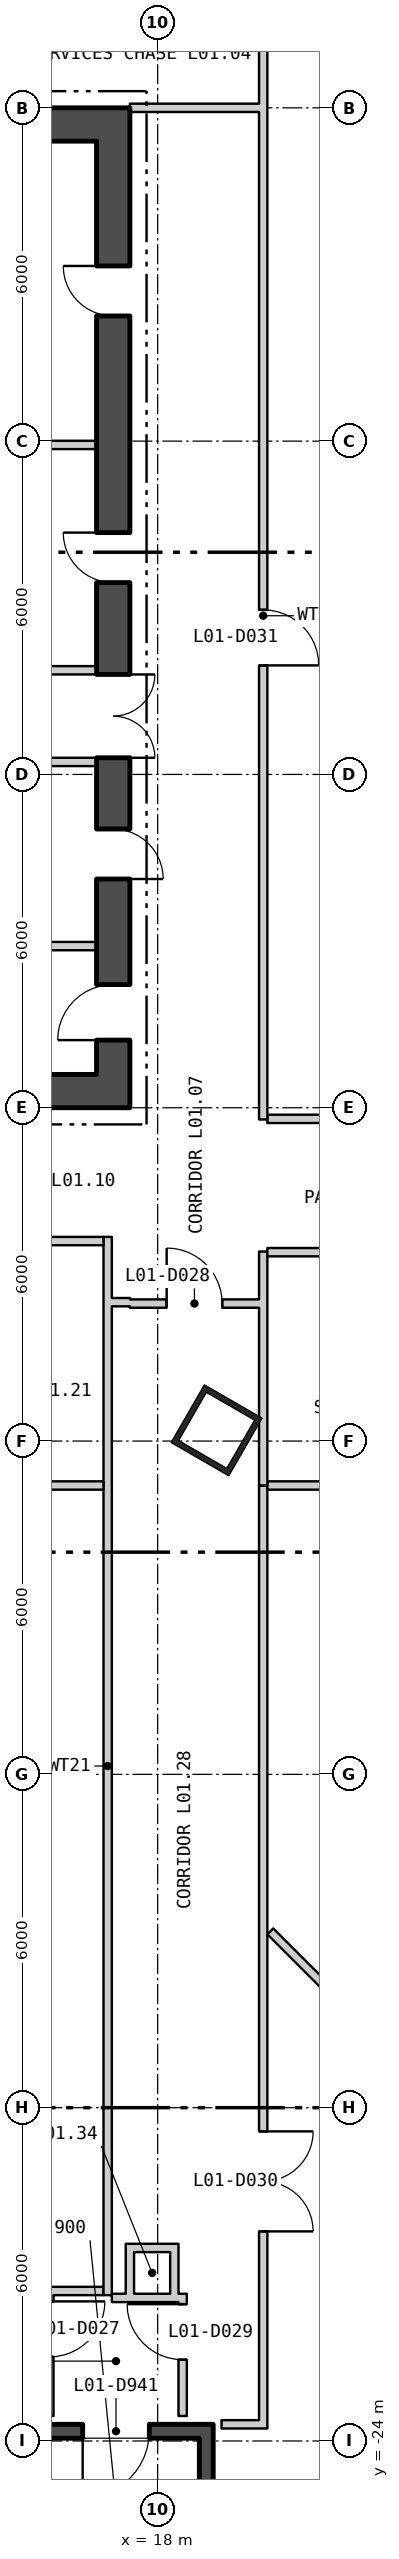
"""IFC4 building model, lengths in metres.
Left out: names, types, materials, properties, quantities, classifications, styles, units other than length and angle.
Written with IfcOpenShell. Run it as: python <this file> out.ifc"""

import sys

from ifc_helpers import new_model, si_unit, direction, frame, frame_2d, origin, origin_2d, place, context, subcontext, project, spatial, rectangle, hollow_rectangle, extrude, element, fill, save


model = new_model("IFC4")
c1 = context("Model", 3, precision=1e-05, world=origin(), true_north=direction((0.0, 1.0)))
c2 = subcontext(c1, "Body", "Model", "MODEL_VIEW")
j1 = project(units=[si_unit("LENGTHUNIT", "METRE"), si_unit("PLANEANGLEUNIT", "RADIAN")], contexts=[c1])
p1 = place(None, origin())
s1 = spatial("IfcSite", under=j1, at=p1, CompositionType="ELEMENT")
p2 = place(p1, origin())
s2 = spatial("IfcBuilding", under=s1, at=p2, CompositionType="ELEMENT")
p3 = place(p2, frame((0.0, 0.0, 8.4)))
s3 = spatial("IfcBuildingStorey", under=s2, at=p3, CompositionType="ELEMENT", Elevation=8.4)
p4 = place(p3, frame((19.061, -5.807, 0.0), z_axis=(0.0, 0.0, 1.0), x_axis=(0.5, 0.866025403784, 0.0)))
e1 = element("IfcColumn", 1, at=p4, inside=s3, PredefinedType="COLUMN", context=c2, shape_type="SweptSolid", body=[
    extrude(hollow_rectangle(XDim=1.2, YDim=1.2, WallThickness=0.1, at=origin_2d()), origin(), (0.0, 0.0, 1.0), 5.1),
])
p5 = place(p3, frame((-17.5, 0.3, 0.0), z_axis=(0.0, 0.0, 1.0), x_axis=(1.0, 0.0, 0.0)))
e2 = element("IfcWall", 2, at=p5, inside=s3, PredefinedType="SHEAR", context=c2, shape_type="SweptSolid", body=[
    extrude(rectangle(XDim=35.0, YDim=0.6, at=frame_2d((17.5, 0.0))), origin(), (0.0, 0.0, 1.0), 4.88),
])
p6 = place(p5, frame((12.0, 0.0, 0.0)))
e3 = element("IfcOpeningElement", 3, at=p6, cuts=e2, PredefinedType="OPENING", context=c2, shape_type="SweptSolid", body=[
    extrude(rectangle(XDim=1.8, YDim=2.4, at=frame_2d((0.9, 1.2))), frame((0.0, 0.31, 0.0), z_axis=(0.0, -1.0, 0.0), x_axis=(1.0, 0.0, 0.0)), (0.0, 0.0, 1.0), 0.62),
])
p7 = place(p5, frame((22.0, 0.0, 0.0)))
e4 = element("IfcOpeningElement", 4, at=p7, cuts=e2, PredefinedType="OPENING", context=c2, shape_type="SweptSolid", body=[
    extrude(rectangle(XDim=1.8, YDim=2.4, at=frame_2d((0.9, 1.2))), frame((0.0, 0.31, 0.0), z_axis=(0.0, -1.0, 0.0), x_axis=(1.0, 0.0, 0.0)), (0.0, 0.0, 1.0), 0.62),
])
p8 = place(p3, frame((-17.5, 17.7, 0.0), z_axis=(0.0, 0.0, 1.0), x_axis=(1.0, 0.0, 0.0)))
e5 = element("IfcWall", 5, at=p8, inside=s3, PredefinedType="SHEAR", context=c2, shape_type="SweptSolid", body=[
    extrude(rectangle(XDim=35.0, YDim=0.6, at=frame_2d((17.5, 0.0))), origin(), (0.0, 0.0, 1.0), 4.88),
])
p9 = place(p3, frame((17.2, 0.6, 0.0), z_axis=(0.0, 0.0, 1.0), x_axis=(0.0, 1.0, 0.0)))
e6 = element("IfcWall", 6, at=p9, inside=s3, PredefinedType="SHEAR", context=c2, shape_type="SweptSolid", body=[
    extrude(rectangle(XDim=16.8, YDim=0.6, at=frame_2d((8.4, 0.0))), origin(), (0.0, 0.0, 1.0), 4.88),
])
p10 = place(p9, frame((5.7, 0.0, 0.0)))
e7 = element("IfcOpeningElement", 7, at=p10, cuts=e6, PredefinedType="OPENING", context=c2, shape_type="SweptSolid", body=[
    extrude(rectangle(XDim=1.5, YDim=2.1, at=frame_2d((0.75, 1.05))), frame((0.0, 0.31, 0.0), z_axis=(0.0, -1.0, 0.0), x_axis=(1.0, 0.0, 0.0)), (0.0, 0.0, 1.0), 0.62),
])
p11 = place(p9, frame((0.618, 0.0, 0.0)))
e8 = element("IfcOpeningElement", 8, at=p11, cuts=e6, PredefinedType="OPENING", context=c2, shape_type="SweptSolid", body=[
    extrude(rectangle(XDim=1.0, YDim=2.1, at=frame_2d((0.5, 1.05))), frame((0.0, 0.31, 0.0), z_axis=(0.0, -1.0, 0.0), x_axis=(1.0, 0.0, 0.0)), (0.0, 0.0, 1.0), 0.62),
])
p12 = place(p9, frame((3.518, 0.0, 0.0)))
e9 = element("IfcOpeningElement", 9, at=p12, cuts=e6, PredefinedType="OPENING", context=c2, shape_type="SweptSolid", body=[
    extrude(rectangle(XDim=0.9, YDim=2.1, at=frame_2d((0.45, 1.05))), frame((0.0, 0.31, 0.0), z_axis=(0.0, -1.0, 0.0), x_axis=(1.0, 0.0, 0.0)), (0.0, 0.0, 1.0), 0.62),
])
p13 = place(p9, frame((8.853, 0.0, 0.0)))
e10 = element("IfcOpeningElement", 10, at=p13, cuts=e6, PredefinedType="OPENING", context=c2, shape_type="SweptSolid", body=[
    extrude(rectangle(XDim=0.9, YDim=2.1, at=frame_2d((0.45, 1.05))), frame((0.0, 0.31, 0.0), z_axis=(0.0, -1.0, 0.0), x_axis=(1.0, 0.0, 0.0)), (0.0, 0.0, 1.0), 0.62),
])
p14 = place(p9, frame((13.653, 0.0, 0.0)))
e11 = element("IfcOpeningElement", 11, at=p14, cuts=e6, PredefinedType="OPENING", context=c2, shape_type="SweptSolid", body=[
    extrude(rectangle(XDim=0.9, YDim=2.1, at=frame_2d((0.45, 1.05))), frame((0.0, 0.31, 0.0), z_axis=(0.0, -1.0, 0.0), x_axis=(1.0, 0.0, 0.0)), (0.0, 0.0, 1.0), 0.62),
])
for number, where, z_axis, x_axis in (
    (12, (14.5, 6.225, 0.0), (0.0, 0.0, 1.0), (1.0, 0.0, 0.0)),
    (13, (14.5, 7.875, 0.0), (0.0, 0.0, 1.0), (1.0, 0.0, 0.0)),
    (14, (14.5, 2.91, 0.0), (0.0, 0.0, 1.0), (1.0, 0.0, 0.0)),
    (15, (14.5, 11.932, 0.0), (0.0, 0.0, 1.0), (1.0, 0.0, 0.0)),
):
    element("IfcWall", number, at=place(p3, frame(where, z_axis=z_axis, x_axis=x_axis)), inside=s3, PredefinedType="PARTITIONING", context=c2, shape_type="SweptSolid", body=[
        extrude(rectangle(XDim=2.4, YDim=0.15, at=frame_2d((1.2, 0.0))), origin(), (0.0, 0.0, 1.0), 4.88),
    ])
p15 = place(p3, frame((18.875, -31.25, 0.0), z_axis=(0.0, 0.0, 1.0), x_axis=(0.0, 1.0, 0.0)))
e16 = element("IfcWall", 16, at=p15, inside=s3, PredefinedType="SHEAR", context=c2, shape_type="SweptSolid", body=[
    extrude(rectangle(XDim=7.3, YDim=0.25, at=frame_2d((3.65, 0.0))), origin(), (0.0, 0.0, 1.0), 4.88),
])
p16 = place(p3, frame((15.5, -23.825, 0.0), z_axis=(0.0, 0.0, 1.0), x_axis=(1.0, 0.0, 0.0)))
e17 = element("IfcWall", 17, at=p16, inside=s3, PredefinedType="SHEAR", context=c2, shape_type="SweptSolid", body=[
    extrude(rectangle(XDim=3.5, YDim=0.25, at=frame_2d((1.75, 0.0))), origin(), (0.0, 0.0, 1.0), 4.88),
])
p17 = place(p16, frame((1.15, 0.0, 0.0)))
e18 = element("IfcOpeningElement", 18, at=p17, cuts=e17, PredefinedType="OPENING", context=c2, shape_type="SweptSolid", body=[
    extrude(rectangle(XDim=1.2, YDim=2.1, at=frame_2d((0.6, 1.05))), frame((0.0, 0.135, 0.0), z_axis=(0.0, -1.0, 0.0), x_axis=(1.0, 0.0, 0.0)), (0.0, 0.0, 1.0), 0.27),
])
p18 = place(p3, frame((1.7, -21.3, 0.0), z_axis=(0.0, 0.0, 1.0), x_axis=(1.0, 0.0, 0.0)))
e19 = element("IfcWall", 19, at=p18, inside=s3, PredefinedType="PARTITIONING", context=c2, shape_type="SweptSolid", body=[
    extrude(rectangle(XDim=15.325, YDim=0.15, at=frame_2d((7.662, 0.0))), origin(), (0.0, 0.0, 1.0), 4.88),
])
p19 = place(p18, frame((0.2, 0.0, 0.0)))
e20 = element("IfcOpeningElement", 20, at=p19, cuts=e19, PredefinedType="OPENING", context=c2, shape_type="SweptSolid", body=[
    extrude(rectangle(XDim=1.0, YDim=2.1, at=frame_2d((0.5, 1.05))), frame((0.0, 0.085, 0.0), z_axis=(0.0, -1.0, 0.0), x_axis=(1.0, 0.0, 0.0)), (0.0, 0.0, 1.0), 0.17),
])
p20 = place(p3, frame((9.075, -6.8, 0.0), z_axis=(0.0, 0.0, 1.0), x_axis=(1.0, 0.0, 0.0)))
e21 = element("IfcWall", 21, at=p20, inside=s3, PredefinedType="PARTITIONING", context=c2, shape_type="SweptSolid", body=[
    extrude(rectangle(XDim=7.95, YDim=0.15, at=frame_2d((3.975, 0.0))), origin(), (0.0, 0.0, 1.0), 4.88),
])
p21 = place(p3, frame((9.075, -2.4, 0.0), z_axis=(0.0, 0.0, 1.0), x_axis=(1.0, 0.0, 0.0)))
e22 = element("IfcWall", 22, at=p21, inside=s3, PredefinedType="PARTITIONING", context=c2, shape_type="SweptSolid", body=[
    extrude(rectangle(XDim=7.95, YDim=0.15, at=frame_2d((3.975, 0.0))), origin(), (0.0, 0.0, 1.0), 4.88),
])
p22 = place(p21, frame((1.329, 0.0, 0.0)))
e23 = element("IfcOpeningElement", 23, at=p22, cuts=e22, PredefinedType="OPENING", context=c2, shape_type="SweptSolid", body=[
    extrude(rectangle(XDim=1.0, YDim=2.1, at=frame_2d((0.5, 1.05))), frame((0.0, 0.085, 0.0), z_axis=(0.0, -1.0, 0.0), x_axis=(1.0, 0.0, 0.0)), (0.0, 0.0, 1.0), 0.17),
])
p23 = place(p21, frame((5.279, 0.0, 0.0)))
e24 = element("IfcOpeningElement", 24, at=p23, cuts=e22, PredefinedType="OPENING", context=c2, shape_type="SweptSolid", body=[
    extrude(rectangle(XDim=1.0, YDim=2.1, at=frame_2d((0.5, 1.05))), frame((0.0, 0.085, 0.0), z_axis=(0.0, -1.0, 0.0), x_axis=(1.0, 0.0, 0.0)), (0.0, 0.0, 1.0), 0.17),
])
p24 = place(p3, frame((16.05, -23.55, 0.0), z_axis=(0.0, 0.0, 1.0), x_axis=(0.0, 1.0, 0.0)))
e25 = element("IfcWall", 25, at=p24, inside=s3, PredefinedType="PARTITIONING", context=c2, shape_type="SweptSolid", body=[
    extrude(rectangle(XDim=2.175, YDim=0.15, at=frame_2d((1.087, 0.0))), origin(), (0.0, 0.0, 1.0), 4.88),
])
p25 = place(p24, frame((1.063, 0.0, 0.0)))
e26 = element("IfcOpeningElement", 26, at=p25, cuts=e25, PredefinedType="OPENING", context=c2, shape_type="SweptSolid", body=[
    extrude(rectangle(XDim=1.0, YDim=2.1, at=frame_2d((0.5, 1.05))), frame((0.0, 0.085, 0.0), z_axis=(0.0, -1.0, 0.0), x_axis=(1.0, 0.0, 0.0)), (0.0, 0.0, 1.0), 0.17),
])
p26 = place(p3, frame((17.1, -21.375, 0.0), z_axis=(0.0, 0.0, 1.0), x_axis=(0.0, 1.0, 0.0)))
e27 = element("IfcWall", 27, at=p26, inside=s3, PredefinedType="PARTITIONING", context=c2, shape_type="SweptSolid", body=[
    extrude(rectangle(XDim=19.05, YDim=0.15, at=frame_2d((9.525, 0.0))), origin(), (0.0, 0.0, 1.0), 4.88),
])
p27 = place(p3, frame((17.175, -21.425, 0.0), z_axis=(0.0, 0.0, 1.0), x_axis=(1.0, 0.0, 0.0)))
e28 = element("IfcWall", 28, at=p27, inside=s3, PredefinedType="PARTITIONING", context=c2, shape_type="SweptSolid", body=[
    extrude(rectangle(XDim=0.25, YDim=0.15, at=frame_2d((0.125, 0.0))), origin(), (0.0, 0.0, 1.0), 4.88),
])
p28 = place(p3, frame((17.175, -3.5, 0.0), z_axis=(0.0, 0.0, 1.0), x_axis=(1.0, 0.0, 0.0)))
e29 = element("IfcWall", 29, at=p28, inside=s3, PredefinedType="PARTITIONING", context=c2, shape_type="SweptSolid", body=[
    extrude(rectangle(XDim=0.325, YDim=0.15, at=frame_2d((0.163, 0.0))), origin(), (0.0, 0.0, 1.0), 4.88),
])
p29 = place(p3, frame((17.5, -21.5, 0.0), z_axis=(0.0, 0.0, 1.0), x_axis=(0.0, 1.0, 0.0)))
e30 = element("IfcWall", 30, at=p29, inside=s3, PredefinedType="PARTITIONING", context=c2, shape_type="SweptSolid", body=[
    extrude(rectangle(XDim=1.05, YDim=0.15, at=frame_2d((0.525, 0.0))), origin(), (0.0, 0.0, 1.0), 4.88),
])
p30 = place(p3, frame((17.5, -3.525, 0.0), z_axis=(0.0, 0.0, 1.0), x_axis=(1.0, 0.0, 0.0)))
e31 = element("IfcWall", 31, at=p30, inside=s3, PredefinedType="PARTITIONING", context=c2, shape_type="SweptSolid", body=[
    extrude(rectangle(XDim=2.325, YDim=0.15, at=frame_2d((1.163, 0.0))), origin(), (0.0, 0.0, 1.0), 4.88),
])
p31 = place(p30, frame((0.662, 0.0, 0.0)))
e32 = element("IfcOpeningElement", 32, at=p31, cuts=e31, PredefinedType="OPENING", context=c2, shape_type="SweptSolid", body=[
    extrude(rectangle(XDim=1.0, YDim=2.1, at=frame_2d((0.5, 1.05))), frame((0.0, 0.085, 0.0), z_axis=(0.0, -1.0, 0.0), x_axis=(1.0, 0.0, 0.0)), (0.0, 0.0, 1.0), 0.17),
])
p32 = place(p3, frame((17.5, 18.0, 0.0), z_axis=(0.0, 0.0, 1.0), x_axis=(1.0, 0.0, 0.0)))
e33 = element("IfcWall", 33, at=p32, inside=s3, PredefinedType="PARTITIONING", context=c2, shape_type="SweptSolid", body=[
    extrude(rectangle(XDim=2.475, YDim=0.15, at=frame_2d((1.238, 0.0))), origin(), (0.0, 0.0, 1.0), 4.33),
])
for number, where, z_axis, x_axis in (
    (34, (17.575, -21.425, 0.0), (0.0, 0.0, 1.0), (1.0, 0.0, 0.0)),
    (35, (17.575, -20.525, 0.0), (0.0, 0.0, 1.0), (1.0, 0.0, 0.0)),
):
    element("IfcWall", number, at=place(p3, frame(where, z_axis=z_axis, x_axis=x_axis)), inside=s3, PredefinedType="PARTITIONING", context=c2, shape_type="SweptSolid", body=[
        extrude(rectangle(XDim=0.65, YDim=0.15, at=frame_2d((0.325, 0.0))), origin(), (0.0, 0.0, 1.0), 4.88),
    ])
p33 = place(p3, frame((18.3, -21.5, 0.0), z_axis=(0.0, 0.0, 1.0), x_axis=(0.0, 1.0, 0.0)))
e36 = element("IfcWall", 36, at=p33, inside=s3, PredefinedType="PARTITIONING", context=c2, shape_type="SweptSolid", body=[
    extrude(rectangle(XDim=1.05, YDim=0.15, at=frame_2d((0.525, 0.0))), origin(), (0.0, 0.0, 1.0), 4.88),
])
p34 = place(p3, frame((18.45, -23.55, 0.0), z_axis=(0.0, 0.0, 1.0), x_axis=(0.0, 1.0, 0.0)))
e37 = element("IfcWall", 37, at=p34, inside=s3, PredefinedType="PARTITIONING", context=c2, shape_type="SweptSolid", body=[
    extrude(rectangle(XDim=2.2, YDim=0.15, at=frame_2d((1.1, 0.0))), origin(), (0.0, 0.0, 1.0), 4.88),
])
p35 = place(p34, frame((1.013, 0.0, 0.0)))
e38 = element("IfcOpeningElement", 38, at=p35, cuts=e37, PredefinedType="OPENING", context=c2, shape_type="SweptSolid", body=[
    extrude(rectangle(XDim=1.0, YDim=2.1, at=frame_2d((0.5, 1.05))), frame((0.0, 0.085, 0.0), z_axis=(0.0, -1.0, 0.0), x_axis=(1.0, 0.0, 0.0)), (0.0, 0.0, 1.0), 0.17),
])
p36 = place(p3, frame((19.15, -23.7, 0.0), z_axis=(0.0, 0.0, 1.0), x_axis=(1.0, 0.0, 0.0)))
e39 = element("IfcWall", 39, at=p36, inside=s3, PredefinedType="PARTITIONING", context=c2, shape_type="SweptSolid", body=[
    extrude(rectangle(XDim=0.675, YDim=0.15, at=frame_2d((0.338, 0.0))), origin(), (0.0, 0.0, 1.0), 4.88),
])
p37 = place(p3, frame((19.9, -23.775, 0.0), z_axis=(0.0, 0.0, 1.0), x_axis=(0.0, 1.0, 0.0)))
e40 = element("IfcWall", 40, at=p37, inside=s3, PredefinedType="PARTITIONING", context=c2, shape_type="SweptSolid", body=[
    extrude(rectangle(XDim=16.972, YDim=0.15, at=frame_2d((8.486, 0.0))), origin(), (0.0, 0.0, 1.0), 4.88),
])
p38 = place(p37, frame((3.548, 0.0, 0.0)))
e41 = element("IfcOpeningElement", 41, at=p38, cuts=e40, PredefinedType="OPENING", context=c2, shape_type="SweptSolid", body=[
    extrude(rectangle(XDim=1.8, YDim=2.1, at=frame_2d((0.9, 1.05))), frame((0.0, 0.085, 0.0), z_axis=(0.0, -1.0, 0.0), x_axis=(1.0, 0.0, 0.0)), (0.0, 0.0, 1.0), 0.17),
])
p39 = place(p3, frame((19.9, -6.8, 0.0), z_axis=(0.0, 0.0, 1.0), x_axis=(0.0, 1.0, 0.0)))
e42 = element("IfcWall", 42, at=p39, inside=s3, PredefinedType="PARTITIONING", context=c2, shape_type="SweptSolid", body=[
    extrude(rectangle(XDim=4.212, YDim=0.15, at=frame_2d((2.106, 0.0))), origin(), (0.0, 0.0, 1.0), 4.88),
])
p40 = place(p3, frame((19.9, -0.211, 0.0), z_axis=(0.0, 0.0, 1.0), x_axis=(0.0, 1.0, 0.0)))
e43 = element("IfcWall", 43, at=p40, inside=s3, PredefinedType="PARTITIONING", context=c2, shape_type="SweptSolid", body=[
    extrude(rectangle(XDim=18.136, YDim=0.15, at=frame_2d((9.068, 0.0))), origin(), (0.0, 0.0, 1.0), 4.88),
])
p41 = place(p40, frame((8.174, 0.0, 0.0)))
e44 = element("IfcOpeningElement", 44, at=p41, cuts=e43, PredefinedType="OPENING", context=c2, shape_type="SweptSolid", body=[
    extrude(rectangle(XDim=1.0, YDim=2.1, at=frame_2d((0.5, 1.05))), frame((0.0, 0.085, 0.0), z_axis=(0.0, -1.0, 0.0), x_axis=(1.0, 0.0, 0.0)), (0.0, 0.0, 1.0), 0.17),
])
p42 = place(p3, frame((19.9, 18.075, 0.0), z_axis=(0.0, 0.0, 1.0), x_axis=(0.0, 1.0, 0.0)))
e45 = element("IfcWall", 45, at=p42, inside=s3, PredefinedType="PARTITIONING", context=c2, shape_type="SweptSolid", body=[
    extrude(rectangle(XDim=1.675, YDim=0.15, at=frame_2d((0.838, 0.0))), origin(), (0.0, 0.0, 1.0), 4.88),
])
p43 = place(p3, frame((19.975, -6.8, 0.0), z_axis=(0.0, 0.0, 1.0), x_axis=(1.0, 0.0, 0.0)))
e46 = element("IfcWall", 46, at=p43, inside=s3, PredefinedType="PARTITIONING", context=c2, shape_type="SweptSolid", body=[
    extrude(rectangle(XDim=6.775, YDim=0.15, at=frame_2d((3.388, 0.0))), origin(), (0.0, 0.0, 1.0), 4.09),
])
p44 = place(p3, frame((19.975, -2.6, 0.0), z_axis=(0.0, 0.0, 1.0), x_axis=(1.0, 0.0, 0.0)))
e47 = element("IfcWall", 47, at=p44, inside=s3, PredefinedType="PARTITIONING", context=c2, shape_type="SweptSolid", body=[
    extrude(rectangle(XDim=3.675, YDim=0.15, at=frame_2d((1.837, 0.0))), origin(), (0.0, 0.0, 1.0), 4.88),
])
p45 = place(p44, frame((1.312, 0.0, 0.0)))
e48 = element("IfcOpeningElement", 48, at=p45, cuts=e47, PredefinedType="OPENING", context=c2, shape_type="SweptSolid", body=[
    extrude(rectangle(XDim=1.0, YDim=2.1, at=frame_2d((0.5, 1.05))), frame((0.0, 0.085, 0.0), z_axis=(0.0, -1.0, 0.0), x_axis=(1.0, 0.0, 0.0)), (0.0, 0.0, 1.0), 0.17),
])
p46 = place(p3, frame((19.975, -0.2, 0.0), z_axis=(0.0, 0.0, 1.0), x_axis=(1.0, 0.0, 0.0)))
e49 = element("IfcWall", 49, at=p46, inside=s3, PredefinedType="PARTITIONING", context=c2, shape_type="SweptSolid", body=[
    extrude(rectangle(XDim=6.775, YDim=0.15, at=frame_2d((3.388, 0.0))), origin(), (0.0, 0.0, 1.0), 4.88),
])
p47 = place(p3, frame((20.028, -14.826, 0.0), z_axis=(0.0, 0.0, 1.0), x_axis=(0.707106781187, -0.707106781187, 0.0)))
e50 = element("IfcWall", 50, at=p47, inside=s3, PredefinedType="PARTITIONING", context=c2, shape_type="SweptSolid", body=[
    extrude(rectangle(XDim=7.07, YDim=0.15, at=frame_2d((3.535, 0.0))), origin(), (0.0, 0.0, 1.0), 4.88),
])
p48 = place(p10, origin())
e51 = element("IfcDoor", 51, at=p48, inside=s3, OperationType="DOUBLE_DOOR_SINGLE_SWING", PredefinedType="DOOR", context=c2, shape_type="SweptSolid", body=[
    extrude(rectangle(XDim=1.5, YDim=2.1, at=frame_2d((0.75, 1.05))), frame((0.0, 0.025, 0.0), z_axis=(0.0, -1.0, 0.0), x_axis=(1.0, 0.0, 0.0)), (0.0, 0.0, 1.0), 0.05),
])
fill(e7, e51)
p49 = place(p11, origin())
e52 = element("IfcDoor", 52, at=p49, inside=s3, OperationType="SINGLE_SWING_RIGHT", PredefinedType="DOOR", context=c2, shape_type="SweptSolid", body=[
    extrude(rectangle(XDim=1.0, YDim=2.1, at=frame_2d((0.5, 1.05))), frame((0.0, 0.025, 0.0), z_axis=(0.0, -1.0, 0.0), x_axis=(1.0, 0.0, 0.0)), (0.0, 0.0, 1.0), 0.05),
])
fill(e8, e52)
p50 = place(p12, origin())
e53 = element("IfcDoor", 53, at=p50, inside=s3, OperationType="SINGLE_SWING_LEFT", PredefinedType="DOOR", context=c2, shape_type="SweptSolid", body=[
    extrude(rectangle(XDim=0.9, YDim=2.1, at=frame_2d((0.45, 1.05))), frame((0.0, 0.025, 0.0), z_axis=(0.0, -1.0, 0.0), x_axis=(1.0, 0.0, 0.0)), (0.0, 0.0, 1.0), 0.05),
])
fill(e9, e53)
p51 = place(p13, origin())
e54 = element("IfcDoor", 54, at=p51, inside=s3, OperationType="SINGLE_SWING_LEFT", PredefinedType="DOOR", context=c2, shape_type="SweptSolid", body=[
    extrude(rectangle(XDim=0.9, YDim=2.1, at=frame_2d((0.45, 1.05))), frame((0.0, 0.025, 0.0), z_axis=(0.0, -1.0, 0.0), x_axis=(1.0, 0.0, 0.0)), (0.0, 0.0, 1.0), 0.05),
])
fill(e10, e54)
p52 = place(p14, origin())
e55 = element("IfcDoor", 55, at=p52, inside=s3, OperationType="SINGLE_SWING_LEFT", PredefinedType="DOOR", context=c2, shape_type="SweptSolid", body=[
    extrude(rectangle(XDim=0.9, YDim=2.1, at=frame_2d((0.45, 1.05))), frame((0.0, 0.025, 0.0), z_axis=(0.0, -1.0, 0.0), x_axis=(1.0, 0.0, 0.0)), (0.0, 0.0, 1.0), 0.05),
])
fill(e11, e55)
p53 = place(p17, origin())
e56 = element("IfcDoor", 56, at=p53, inside=s3, OperationType="SINGLE_SWING_LEFT", PredefinedType="DOOR", context=c2, shape_type="SweptSolid", body=[
    extrude(rectangle(XDim=1.2, YDim=2.1, at=frame_2d((0.6, 1.05))), frame((0.0, 0.025, 0.0), z_axis=(0.0, -1.0, 0.0), x_axis=(1.0, 0.0, 0.0)), (0.0, 0.0, 1.0), 0.05),
])
fill(e18, e56)
p54 = place(p31, origin())
e57 = element("IfcDoor", 57, at=p54, inside=s3, OperationType="SINGLE_SWING_RIGHT", PredefinedType="DOOR", context=c2, shape_type="SweptSolid", body=[
    extrude(rectangle(XDim=1.0, YDim=2.1, at=frame_2d((0.5, 1.05))), frame((0.0, 0.025, 0.0), z_axis=(0.0, -1.0, 0.0), x_axis=(1.0, 0.0, 0.0)), (0.0, 0.0, 1.0), 0.05),
])
fill(e32, e57)
p55 = place(p35, origin())
e58 = element("IfcDoor", 58, at=p55, inside=s3, OperationType="SINGLE_SWING_LEFT", PredefinedType="DOOR", context=c2, shape_type="SweptSolid", body=[
    extrude(rectangle(XDim=1.0, YDim=2.1, at=frame_2d((0.5, 1.05))), frame((0.0, 0.025, 0.0), z_axis=(0.0, -1.0, 0.0), x_axis=(1.0, 0.0, 0.0)), (0.0, 0.0, 1.0), 0.05),
])
fill(e38, e58)
p56 = place(p38, origin())
e59 = element("IfcDoor", 59, at=p56, inside=s3, OperationType="DOUBLE_DOOR_SINGLE_SWING", PredefinedType="DOOR", context=c2, shape_type="SweptSolid", body=[
    extrude(rectangle(XDim=1.8, YDim=2.1, at=frame_2d((0.9, 1.05))), frame((0.0, 0.025, 0.0), z_axis=(0.0, -1.0, 0.0), x_axis=(1.0, 0.0, 0.0)), (0.0, 0.0, 1.0), 0.05),
])
fill(e41, e59)
p57 = place(p41, origin())
e60 = element("IfcDoor", 60, at=p57, inside=s3, OperationType="SINGLE_SWING_LEFT", PredefinedType="DOOR", context=c2, shape_type="SweptSolid", body=[
    extrude(rectangle(XDim=1.0, YDim=2.1, at=frame_2d((0.5, 1.05))), frame((0.0, 0.025, 0.0), z_axis=(0.0, -1.0, 0.0), x_axis=(1.0, 0.0, 0.0)), (0.0, 0.0, 1.0), 0.05),
])
fill(e44, e60)
save(model, sys.argv[1])
